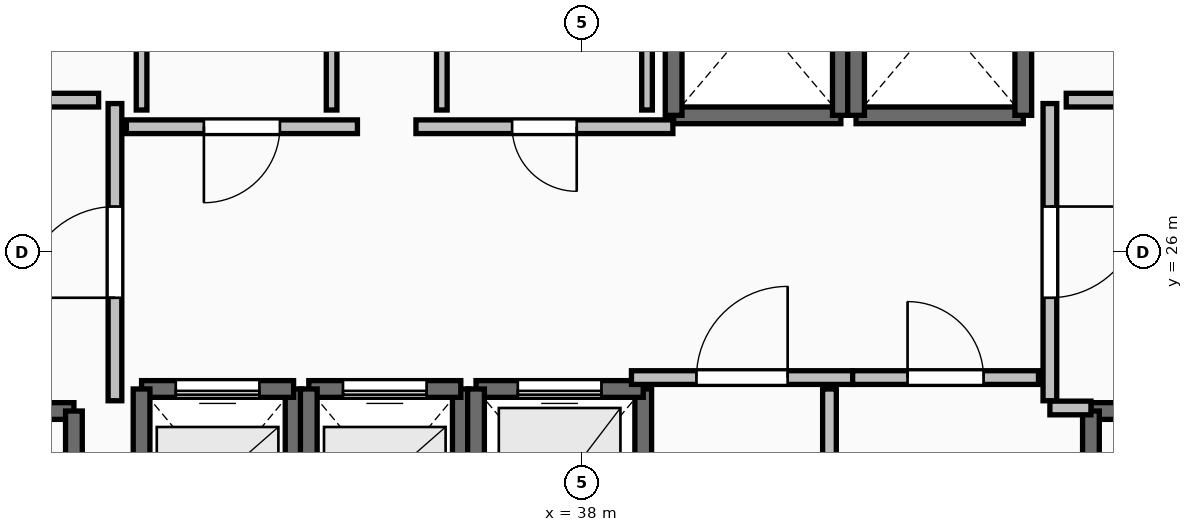
"""IFC4 building model, lengths in metres.
Left out: names, types, materials, properties, quantities, classifications, styles, units other than length and angle.
Written with IfcOpenShell. Run it as: python <this file> out.ifc"""

import sys

from ifc_helpers import new_model, si_unit, direction, frame, frame_2d, origin, place, context, subcontext, project, spatial, rectangle, extrude, element, fill, save


model = new_model("IFC4")
c1 = context("Model", 3, precision=1e-05, world=origin(), true_north=direction((0.0, 1.0)))
c2 = subcontext(c1, "Body", "Model", "MODEL_VIEW")
j1 = project(units=[si_unit("LENGTHUNIT", "METRE"), si_unit("PLANEANGLEUNIT", "RADIAN")], contexts=[c1])
p1 = place(None, origin())
s1 = spatial("IfcSite", under=j1, at=p1, CompositionType="ELEMENT")
p2 = place(p1, origin())
s2 = spatial("IfcBuilding", under=s1, at=p2, CompositionType="ELEMENT")
p3 = place(p2, frame((0.0, 0.0, 132.6)))
s3 = spatial("IfcBuildingStorey", under=s2, at=p3, CompositionType="ELEMENT", Elevation=132.6)
p4 = place(p3, frame((27.94, 23.91, 0.0), z_axis=(0.0, 0.0, 1.0), x_axis=(1.0, 0.0, 0.0)))
e1 = element("IfcWall", 1, at=p4, inside=s3, PredefinedType="SOLIDWALL", context=c2, shape_type="SweptSolid", body=[
    extrude(rectangle(XDim=3.37, YDim=0.22, at=frame_2d((1.685, 0.0))), origin(), (0.0, 0.0, 1.0), 3.24),
])
p5 = place(p4, frame((1.135, 0.0, 0.0)))
e2 = element("IfcOpeningElement", 2, at=p5, cuts=e1, PredefinedType="OPENING", context=c2, shape_type="SweptSolid", body=[
    extrude(rectangle(XDim=1.1, YDim=2.15, at=frame_2d((0.55, 1.075))), frame((0.0, 0.125, 0.0), z_axis=(0.0, -1.0, 0.0), x_axis=(1.0, 0.0, 0.0)), (0.0, 0.0, 1.0), 0.25),
])
p6 = place(p3, frame((31.31, 23.91, 0.0), z_axis=(0.0, 0.0, 1.0), x_axis=(0.0, -1.0, 0.0)))
e3 = element("IfcWall", 3, at=p6, inside=s3, PredefinedType="SOLIDWALL", context=c2, shape_type="SweptSolid", body=[
    extrude(rectangle(XDim=7.42, YDim=0.22, at=frame_2d((3.71, 0.0))), origin(), (0.0, 0.0, 1.0), 3.24),
])
p7 = place(p3, frame((44.69, 23.91, 0.0), z_axis=(0.0, 0.0, 1.0), x_axis=(1.0, 0.0, 0.0)))
e4 = element("IfcWall", 4, at=p7, inside=s3, PredefinedType="SOLIDWALL", context=c2, shape_type="SweptSolid", body=[
    extrude(rectangle(XDim=3.37, YDim=0.22, at=frame_2d((1.685, 0.0))), origin(), (0.0, 0.0, 1.0), 3.24),
])
p8 = place(p7, frame((1.135, 0.0, 0.0)))
e5 = element("IfcOpeningElement", 5, at=p8, cuts=e4, PredefinedType="OPENING", context=c2, shape_type="SweptSolid", body=[
    extrude(rectangle(XDim=1.1, YDim=2.15, at=frame_2d((0.55, 1.075))), frame((0.0, 0.125, 0.0), z_axis=(0.0, -1.0, 0.0), x_axis=(1.0, 0.0, 0.0)), (0.0, 0.0, 1.0), 0.25),
])
p9 = place(p3, frame((44.69, 16.49, 0.0), z_axis=(0.0, 0.0, 1.0), x_axis=(0.0, 1.0, 0.0)))
e6 = element("IfcWall", 6, at=p9, inside=s3, PredefinedType="SOLIDWALL", context=c2, shape_type="SweptSolid", body=[
    extrude(rectangle(XDim=7.42, YDim=0.22, at=frame_2d((3.71, 0.0))), origin(), (0.0, 0.0, 1.0), 3.24),
])
p10 = place(p3, frame((34.2, 21.8, 0.0), z_axis=(0.0, 0.0, 1.0), x_axis=(0.0, 1.0, 0.0)))
e7 = element("IfcWall", 7, at=p10, inside=s3, PredefinedType="SOLIDWALL", context=c2, shape_type="SweptSolid", body=[
    extrude(rectangle(XDim=2.4, YDim=0.22, at=frame_2d((1.2, 0.0))), origin(), (0.0, 0.0, 1.0), 3.24),
])
p11 = place(p3, frame((34.2, 24.2, 0.0), z_axis=(0.0, 0.0, 1.0), x_axis=(-1.0, 0.0, 0.0)))
e8 = element("IfcWall", 8, at=p11, inside=s3, PredefinedType="SOLIDWALL", context=c2, shape_type="SweptSolid", body=[
    extrude(rectangle(XDim=2.0, YDim=0.22, at=frame_2d((1.0, 0.0))), origin(), (0.0, 0.0, 1.0), 3.24),
])
p12 = place(p11, frame((0.45, 0.0, 0.0)))
e9 = element("IfcOpeningElement", 9, at=p12, cuts=e8, PredefinedType="OPENING", context=c2, shape_type="SweptSolid", body=[
    extrude(rectangle(XDim=1.1, YDim=2.2, at=frame_2d((0.55, 1.1))), frame((0.0, 0.125, 0.0), z_axis=(0.0, -1.0, 0.0), x_axis=(1.0, 0.0, 0.0)), (0.0, 0.0, 1.0), 0.25),
])
for number, where, z_axis, x_axis in (
    (10, (32.2, 24.2, 0.0), (0.0, 0.0, 1.0), (0.0, -1.0, 0.0)),
    (11, (36.4, 21.8, 0.0), (0.0, 0.0, 1.0), (0.0, 1.0, 0.0)),
):
    element("IfcWall", number, at=place(p3, frame(where, z_axis=z_axis, x_axis=x_axis)), inside=s3, PredefinedType="SOLIDWALL", context=c2, shape_type="SweptSolid", body=[
        extrude(rectangle(XDim=2.4, YDim=0.22, at=frame_2d((1.2, 0.0))), origin(), (0.0, 0.0, 1.0), 3.24),
    ])
p13 = place(p3, frame((36.4, 24.2, 0.0), z_axis=(0.0, 0.0, 1.0), x_axis=(-1.0, 0.0, 0.0)))
e12 = element("IfcWall", 12, at=p13, inside=s3, PredefinedType="SOLIDWALL", context=c2, shape_type="SweptSolid", body=[
    extrude(rectangle(XDim=2.0, YDim=0.22, at=frame_2d((1.0, 0.0))), origin(), (0.0, 0.0, 1.0), 3.24),
])
p14 = place(p13, frame((0.45, 0.0, 0.0)))
e13 = element("IfcOpeningElement", 13, at=p14, cuts=e12, PredefinedType="OPENING", context=c2, shape_type="SweptSolid", body=[
    extrude(rectangle(XDim=1.1, YDim=2.2, at=frame_2d((0.55, 1.1))), frame((0.0, 0.125, 0.0), z_axis=(0.0, -1.0, 0.0), x_axis=(1.0, 0.0, 0.0)), (0.0, 0.0, 1.0), 0.25),
])
p15 = place(p3, frame((34.4, 24.2, 0.0), z_axis=(0.0, 0.0, 1.0), x_axis=(0.0, -1.0, 0.0)))
e14 = element("IfcWall", 14, at=p15, inside=s3, PredefinedType="SOLIDWALL", context=c2, shape_type="SweptSolid", body=[
    extrude(rectangle(XDim=2.4, YDim=0.22, at=frame_2d((1.2, 0.0))), origin(), (0.0, 0.0, 1.0), 3.24),
])
p16 = place(p3, frame((38.8, 21.6, 0.0), z_axis=(0.0, 0.0, 1.0), x_axis=(0.0, 1.0, 0.0)))
e15 = element("IfcWall", 15, at=p16, inside=s3, PredefinedType="SOLIDWALL", context=c2, shape_type="SweptSolid", body=[
    extrude(rectangle(XDim=2.6, YDim=0.22, at=frame_2d((1.3, 0.0))), origin(), (0.0, 0.0, 1.0), 3.24),
])
p17 = place(p3, frame((38.8, 24.2, 0.0), z_axis=(0.0, 0.0, 1.0), x_axis=(-1.0, 0.0, 0.0)))
e16 = element("IfcWall", 16, at=p17, inside=s3, PredefinedType="SOLIDWALL", context=c2, shape_type="SweptSolid", body=[
    extrude(rectangle(XDim=2.2, YDim=0.22, at=frame_2d((1.1, 0.0))), origin(), (0.0, 0.0, 1.0), 3.24),
])
p18 = place(p17, frame((0.55, 0.0, 0.0)))
e17 = element("IfcOpeningElement", 17, at=p18, cuts=e16, PredefinedType="OPENING", context=c2, shape_type="SweptSolid", body=[
    extrude(rectangle(XDim=1.1, YDim=2.2, at=frame_2d((0.55, 1.1))), frame((0.0, 0.125, 0.0), z_axis=(0.0, -1.0, 0.0), x_axis=(1.0, 0.0, 0.0)), (0.0, 0.0, 1.0), 0.25),
])
p19 = place(p3, frame((36.6, 24.2, 0.0), z_axis=(0.0, 0.0, 1.0), x_axis=(0.0, -1.0, 0.0)))
e18 = element("IfcWall", 18, at=p19, inside=s3, PredefinedType="SOLIDWALL", context=c2, shape_type="SweptSolid", body=[
    extrude(rectangle(XDim=2.6, YDim=0.22, at=frame_2d((1.3, 0.0))), origin(), (0.0, 0.0, 1.0), 3.24),
])
p20 = place(p3, frame((39.2, 27.8, 0.0), z_axis=(0.0, 0.0, 1.0), x_axis=(1.0, 0.0, 0.0)))
e19 = element("IfcWall", 19, at=p20, inside=s3, PredefinedType="SOLIDWALL", context=c2, shape_type="SweptSolid", body=[
    extrude(rectangle(XDim=2.2, YDim=0.22, at=frame_2d((1.1, 0.0))), origin(), (0.0, 0.0, 1.0), 3.24),
])
for number, where, z_axis, x_axis in (
    (20, (41.4, 27.8, 0.0), (0.0, 0.0, 1.0), (0.0, 1.0, 0.0)),
    (21, (39.2, 30.4, 0.0), (0.0, 0.0, 1.0), (0.0, -1.0, 0.0)),
):
    element("IfcWall", number, at=place(p3, frame(where, z_axis=z_axis, x_axis=x_axis)), inside=s3, PredefinedType="SOLIDWALL", context=c2, shape_type="SweptSolid", body=[
        extrude(rectangle(XDim=2.6, YDim=0.22, at=frame_2d((1.3, 0.0))), origin(), (0.0, 0.0, 1.0), 3.24),
    ])
p21 = place(p3, frame((41.6, 27.8, 0.0), z_axis=(0.0, 0.0, 1.0), x_axis=(1.0, 0.0, 0.0)))
e22 = element("IfcWall", 22, at=p21, inside=s3, PredefinedType="SOLIDWALL", context=c2, shape_type="SweptSolid", body=[
    extrude(rectangle(XDim=2.2, YDim=0.22, at=frame_2d((1.1, 0.0))), origin(), (0.0, 0.0, 1.0), 3.24),
])
for number, where, z_axis, x_axis in (
    (23, (43.8, 27.8, 0.0), (0.0, 0.0, 1.0), (0.0, 1.0, 0.0)),
    (24, (41.6, 30.4, 0.0), (0.0, 0.0, 1.0), (0.0, -1.0, 0.0)),
):
    element("IfcWall", number, at=place(p3, frame(where, z_axis=z_axis, x_axis=x_axis)), inside=s3, PredefinedType="SOLIDWALL", context=c2, shape_type="SweptSolid", body=[
        extrude(rectangle(XDim=2.6, YDim=0.22, at=frame_2d((1.3, 0.0))), origin(), (0.0, 0.0, 1.0), 3.24),
    ])
p22 = place(p3, frame((31.85, 24.045, 0.0), z_axis=(0.0, 0.0, 1.0), x_axis=(0.0, 1.0, 0.0)))
e25 = element("IfcWall", 25, at=p22, inside=s3, PredefinedType="PARTITIONING", context=c2, shape_type="SweptSolid", body=[
    extrude(rectangle(XDim=3.91, YDim=0.18, at=frame_2d((1.955, 0.0))), origin(), (0.0, 0.0, 1.0), 3.24),
])
p23 = place(p22, frame((1.355, 0.0, 0.0)))
e26 = element("IfcOpeningElement", 26, at=p23, cuts=e25, PredefinedType="OPENING", context=c2, shape_type="SweptSolid", body=[
    extrude(rectangle(XDim=1.2, YDim=2.15, at=frame_2d((0.6, 1.075))), frame((0.0, 0.105, 0.0), z_axis=(0.0, -1.0, 0.0), x_axis=(1.0, 0.0, 0.0)), (0.0, 0.0, 1.0), 0.21),
])
p24 = place(p3, frame((44.15, 27.955, 0.0), z_axis=(0.0, 0.0, 1.0), x_axis=(0.0, -1.0, 0.0)))
e27 = element("IfcWall", 27, at=p24, inside=s3, PredefinedType="PARTITIONING", context=c2, shape_type="SweptSolid", body=[
    extrude(rectangle(XDim=3.91, YDim=0.18, at=frame_2d((1.955, 0.0))), origin(), (0.0, 0.0, 1.0), 3.24),
])
p25 = place(p24, frame((1.355, 0.0, 0.0)))
e28 = element("IfcOpeningElement", 28, at=p25, cuts=e27, PredefinedType="OPENING", context=c2, shape_type="SweptSolid", body=[
    extrude(rectangle(XDim=1.2, YDim=2.15, at=frame_2d((0.6, 1.075))), frame((0.0, 0.105, 0.0), z_axis=(0.0, -1.0, 0.0), x_axis=(1.0, 0.0, 0.0)), (0.0, 0.0, 1.0), 0.21),
])
p26 = place(p3, frame((44.15, 23.95, 0.0), z_axis=(0.0, 0.0, 1.0), x_axis=(1.0, 0.0, 0.0)))
e29 = element("IfcWall", 29, at=p26, inside=s3, PredefinedType="PARTITIONING", context=c2, shape_type="SweptSolid", body=[
    extrude(rectangle(XDim=0.54, YDim=0.18, at=frame_2d((0.27, 0.0))), origin(), (0.0, 0.0, 1.0), 3.24),
])
p27 = place(p3, frame((38.645, 24.35, 0.0), z_axis=(0.0, 0.0, 1.0), x_axis=(1.0, 0.0, 0.0)))
e30 = element("IfcWall", 30, at=p27, inside=s3, PredefinedType="PARTITIONING", context=c2, shape_type="SweptSolid", body=[
    extrude(rectangle(XDim=2.91, YDim=0.18, at=frame_2d((1.455, 0.0))), origin(), (0.0, 0.0, 1.0), 3.24),
])
p28 = place(p27, frame((0.855, 0.0, 0.0)))
e31 = element("IfcOpeningElement", 31, at=p28, cuts=e30, PredefinedType="OPENING", context=c2, shape_type="SweptSolid", body=[
    extrude(rectangle(XDim=1.2, YDim=2.15, at=frame_2d((0.6, 1.075))), frame((0.0, 0.105, 0.0), z_axis=(0.0, -1.0, 0.0), x_axis=(1.0, 0.0, 0.0)), (0.0, 0.0, 1.0), 0.21),
])
p29 = place(p3, frame((41.555, 24.35, 0.0), z_axis=(0.0, 0.0, 1.0), x_axis=(1.0, 0.0, 0.0)))
e32 = element("IfcWall", 32, at=p29, inside=s3, PredefinedType="PARTITIONING", context=c2, shape_type="SweptSolid", body=[
    extrude(rectangle(XDim=2.445, YDim=0.18, at=frame_2d((1.223, 0.0))), origin(), (0.0, 0.0, 1.0), 3.24),
])
p30 = place(p29, frame((0.722, 0.0, 0.0)))
e33 = element("IfcOpeningElement", 33, at=p30, cuts=e32, PredefinedType="OPENING", context=c2, shape_type="SweptSolid", body=[
    extrude(rectangle(XDim=1.0, YDim=2.15, at=frame_2d((0.5, 1.075))), frame((0.0, 0.105, 0.0), z_axis=(0.0, -1.0, 0.0), x_axis=(1.0, 0.0, 0.0)), (0.0, 0.0, 1.0), 0.21),
])
p31 = place(p3, frame((35.04, 27.65, 0.0), z_axis=(0.0, 0.0, 1.0), x_axis=(-1.0, 0.0, 0.0)))
e34 = element("IfcWall", 34, at=p31, inside=s3, PredefinedType="PARTITIONING", context=c2, shape_type="SweptSolid", body=[
    extrude(rectangle(XDim=3.04, YDim=0.18, at=frame_2d((1.52, 0.0))), origin(), (0.0, 0.0, 1.0), 3.24),
])
p32 = place(p31, frame((1.02, 0.0, 0.0)))
e35 = element("IfcOpeningElement", 35, at=p32, cuts=e34, PredefinedType="OPENING", context=c2, shape_type="SweptSolid", body=[
    extrude(rectangle(XDim=1.0, YDim=2.15, at=frame_2d((0.5, 1.075))), frame((0.0, 0.105, 0.0), z_axis=(0.0, -1.0, 0.0), x_axis=(1.0, 0.0, 0.0)), (0.0, 0.0, 1.0), 0.21),
])
p33 = place(p3, frame((39.19, 27.65, 0.0), z_axis=(0.0, 0.0, 1.0), x_axis=(-1.0, 0.0, 0.0)))
e36 = element("IfcWall", 36, at=p33, inside=s3, PredefinedType="PARTITIONING", context=c2, shape_type="SweptSolid", body=[
    extrude(rectangle(XDim=3.38, YDim=0.18, at=frame_2d((1.69, 0.0))), origin(), (0.0, 0.0, 1.0), 3.24),
])
p34 = place(p33, frame((1.265, 0.0, 0.0)))
e37 = element("IfcOpeningElement", 37, at=p34, cuts=e36, PredefinedType="OPENING", context=c2, shape_type="SweptSolid", body=[
    extrude(rectangle(XDim=0.85, YDim=2.1, at=frame_2d((0.425, 1.05))), frame((0.0, 0.105, 0.0), z_axis=(0.0, -1.0, 0.0), x_axis=(1.0, 0.0, 0.0)), (0.0, 0.0, 1.0), 0.21),
])
p35 = place(p3, frame((41.25, 20.305, 0.0), z_axis=(0.0, 0.0, 1.0), x_axis=(0.0, 1.0, 0.0)))
e38 = element("IfcWall", 38, at=p35, inside=s3, PredefinedType="PARTITIONING", context=c2, shape_type="SweptSolid", body=[
    extrude(rectangle(XDim=3.895, YDim=0.18, at=frame_2d((1.948, 0.0))), origin(), (0.0, 0.0, 1.0), 3.24),
])
p36 = place(p35, frame((1.448, 0.0, 0.0)))
e39 = element("IfcOpeningElement", 39, at=p36, cuts=e38, PredefinedType="OPENING", context=c2, shape_type="SweptSolid", body=[
    extrude(rectangle(XDim=1.0, YDim=2.15, at=frame_2d((0.5, 1.075))), frame((0.0, 0.105, 0.0), z_axis=(0.0, -1.0, 0.0), x_axis=(1.0, 0.0, 0.0)), (0.0, 0.0, 1.0), 0.21),
])
for number, where, z_axis, x_axis in (
    (40, (31.635, 28.0, 0.0), (0.0, 0.0, 1.0), (-1.0, 0.0, 0.0)),
    (41, (45.28, 28.0, 0.0), (0.0, 0.0, 1.0), (-1.0, 0.0, 0.0)),
):
    element("IfcWall", number, at=place(p3, frame(where, z_axis=z_axis, x_axis=x_axis)), inside=s3, PredefinedType="PARTITIONING", context=c2, shape_type="SweptSolid", body=[
        extrude(rectangle(XDim=0.915, YDim=0.18, at=frame_2d((0.458, 0.0))), origin(), (0.0, 0.0, 1.0), 3.24),
    ])
for number, where, z_axis, x_axis in (
    (42, (32.2, 30.26, 0.0), (0.0, 0.0, 1.0), (0.0, -1.0, 0.0)),
    (43, (34.7, 27.87, 0.0), (0.0, 0.0, 1.0), (0.0, 1.0, 0.0)),
    (44, (36.15, 30.26, 0.0), (0.0, 0.0, 1.0), (0.0, -1.0, 0.0)),
    (45, (38.85, 27.87, 0.0), (0.0, 0.0, 1.0), (0.0, 1.0, 0.0)),
):
    element("IfcWall", number, at=place(p3, frame(where, z_axis=z_axis, x_axis=x_axis)), inside=s3, PredefinedType="PARTITIONING", context=c2, shape_type="SweptSolid", body=[
        extrude(rectangle(XDim=2.39, YDim=0.14, at=frame_2d((1.195, 0.0))), origin(), (0.0, 0.0, 1.0), 3.24),
    ])
p37 = place(p12, origin())
e46 = element("IfcDoor", 46, at=p37, inside=s3, OperationType="SLIDING_TO_LEFT", PredefinedType="DOOR", context=c2, shape_type="SweptSolid", body=[
    extrude(rectangle(XDim=1.1, YDim=2.2, at=frame_2d((0.55, 1.1))), frame((0.0, 0.025, 0.0), z_axis=(0.0, -1.0, 0.0), x_axis=(1.0, 0.0, 0.0)), (0.0, 0.0, 1.0), 0.05),
])
fill(e9, e46)
p38 = place(p14, origin())
e47 = element("IfcDoor", 47, at=p38, inside=s3, OperationType="SLIDING_TO_LEFT", PredefinedType="DOOR", context=c2, shape_type="SweptSolid", body=[
    extrude(rectangle(XDim=1.1, YDim=2.2, at=frame_2d((0.55, 1.1))), frame((0.0, 0.025, 0.0), z_axis=(0.0, -1.0, 0.0), x_axis=(1.0, 0.0, 0.0)), (0.0, 0.0, 1.0), 0.05),
])
fill(e13, e47)
p39 = place(p18, origin())
e48 = element("IfcDoor", 48, at=p39, inside=s3, OperationType="SLIDING_TO_LEFT", PredefinedType="DOOR", context=c2, shape_type="SweptSolid", body=[
    extrude(rectangle(XDim=1.1, YDim=2.2, at=frame_2d((0.55, 1.1))), frame((0.0, 0.025, 0.0), z_axis=(0.0, -1.0, 0.0), x_axis=(1.0, 0.0, 0.0)), (0.0, 0.0, 1.0), 0.05),
])
fill(e17, e48)
p40 = place(p23, origin())
e49 = element("IfcDoor", 49, at=p40, inside=s3, OperationType="SINGLE_SWING_LEFT", PredefinedType="DOOR", context=c2, shape_type="SweptSolid", body=[
    extrude(rectangle(XDim=1.2, YDim=2.15, at=frame_2d((0.6, 1.075))), frame((0.0, 0.025, 0.0), z_axis=(0.0, -1.0, 0.0), x_axis=(1.0, 0.0, 0.0)), (0.0, 0.0, 1.0), 0.05),
])
fill(e26, e49)
p41 = place(p25, origin())
e50 = element("IfcDoor", 50, at=p41, inside=s3, OperationType="SINGLE_SWING_LEFT", PredefinedType="DOOR", context=c2, shape_type="SweptSolid", body=[
    extrude(rectangle(XDim=1.2, YDim=2.15, at=frame_2d((0.6, 1.075))), frame((0.0, 0.025, 0.0), z_axis=(0.0, -1.0, 0.0), x_axis=(1.0, 0.0, 0.0)), (0.0, 0.0, 1.0), 0.05),
])
fill(e28, e50)
p42 = place(p28, origin())
e51 = element("IfcDoor", 51, at=p42, inside=s3, OperationType="SINGLE_SWING_RIGHT", PredefinedType="DOOR", context=c2, shape_type="SweptSolid", body=[
    extrude(rectangle(XDim=1.2, YDim=2.15, at=frame_2d((0.6, 1.075))), frame((0.0, 0.025, 0.0), z_axis=(0.0, -1.0, 0.0), x_axis=(1.0, 0.0, 0.0)), (0.0, 0.0, 1.0), 0.05),
])
fill(e31, e51)
p43 = place(p30, origin())
e52 = element("IfcDoor", 52, at=p43, inside=s3, OperationType="SINGLE_SWING_LEFT", PredefinedType="DOOR", context=c2, shape_type="SweptSolid", body=[
    extrude(rectangle(XDim=1.0, YDim=2.15, at=frame_2d((0.5, 1.075))), frame((0.0, 0.025, 0.0), z_axis=(0.0, -1.0, 0.0), x_axis=(1.0, 0.0, 0.0)), (0.0, 0.0, 1.0), 0.05),
])
fill(e33, e52)
p44 = place(p32, origin())
e53 = element("IfcDoor", 53, at=p44, inside=s3, OperationType="SINGLE_SWING_RIGHT", PredefinedType="DOOR", context=c2, shape_type="SweptSolid", body=[
    extrude(rectangle(XDim=1.0, YDim=2.15, at=frame_2d((0.5, 1.075))), frame((0.0, 0.025, 0.0), z_axis=(0.0, -1.0, 0.0), x_axis=(1.0, 0.0, 0.0)), (0.0, 0.0, 1.0), 0.05),
])
fill(e35, e53)
p45 = place(p34, origin())
e54 = element("IfcDoor", 54, at=p45, inside=s3, OperationType="SINGLE_SWING_LEFT", PredefinedType="DOOR", context=c2, shape_type="SweptSolid", body=[
    extrude(rectangle(XDim=0.85, YDim=2.1, at=frame_2d((0.425, 1.05))), frame((0.0, 0.025, 0.0), z_axis=(0.0, -1.0, 0.0), x_axis=(1.0, 0.0, 0.0)), (0.0, 0.0, 1.0), 0.05),
])
fill(e37, e54)
save(model, sys.argv[1])
